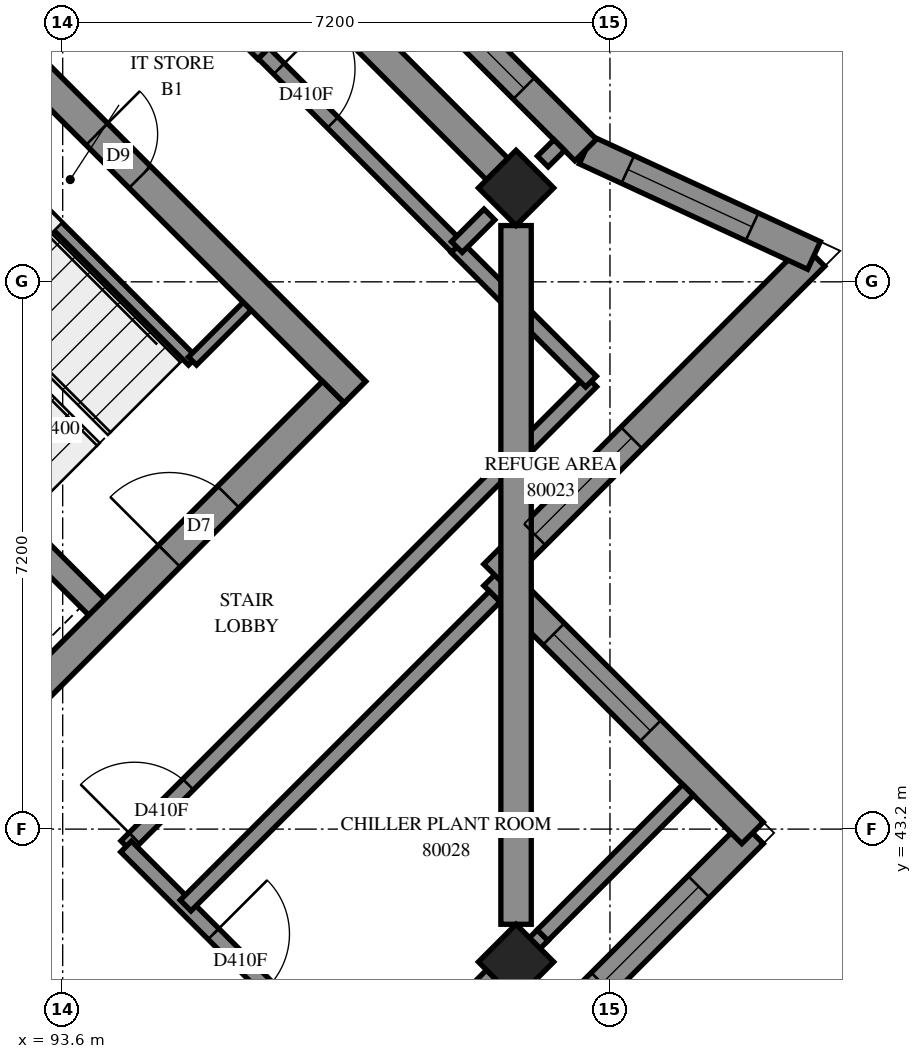
"""IFC4 building model, lengths in metres.
Left out: names, types, materials, properties, quantities, classifications, styles, units other than length and angle.
Written with IfcOpenShell. Run it as: python <this file> out.ifc"""

import sys

from ifc_helpers import new_model, si_unit, direction, frame, frame_2d, origin, origin_2d, place, context, subcontext, project, spatial, polyline, rectangle, outline, extrude, element, fill, save


model = new_model("IFC4")
c1 = context("Model", 3, precision=1e-05, world=origin(), true_north=direction((0.0, 1.0)))
c2 = subcontext(c1, "Body", "Model", "MODEL_VIEW")
j1 = project(units=[si_unit("LENGTHUNIT", "METRE"), si_unit("PLANEANGLEUNIT", "RADIAN")], contexts=[c1])
p1 = place(None, origin())
s1 = spatial("IfcSite", under=j1, at=p1, CompositionType="ELEMENT")
p2 = place(p1, origin())
s2 = spatial("IfcBuilding", under=s1, at=p2, CompositionType="ELEMENT")
p3 = place(p2, frame((0.0, 0.0, 294.4)))
s3 = spatial("IfcBuildingStorey", under=s2, at=p3, CompositionType="ELEMENT", Elevation=294.4)
for number, where, z_axis, x_axis in (
    (1, (99.565, 51.635, 0.0), (0.0, 0.0, 1.0), (0.707, -0.707, 0.0)),
    (2, (99.565, 41.453, 0.0), (0.0, 0.0, 1.0), (0.707, -0.707, 0.0)),
):
    element("IfcColumn", number, at=place(p3, frame(where, z_axis=z_axis, x_axis=x_axis)), inside=s3, PredefinedType="COLUMN", context=c2, shape_type="SweptSolid", body=[
        extrude(rectangle(XDim=0.7, YDim=0.7, at=origin_2d()), origin(), (0.0, 0.0, 1.0), 3.5),
    ])
p4 = place(p3, frame((86.695, 59.696, -0.3), z_axis=(0.0, 0.0, 1.0), x_axis=(0.7071100706, -0.7071034917, 0.0)))
e3 = element("IfcWall", 3, at=p4, inside=s3, PredefinedType="SHEAR", context=c2, shape_type="SweptSolid", body=[
    extrude(outline(polyline([(0.0, 0.0), (15.2, 0.0), (15.2, 3.1), (0.0, 3.1), (0.0, 0.0)])), frame((0.0, 0.2, 0.0), z_axis=(0.0, -1.0, 0.0), x_axis=(1.0, 0.0, 0.0)), (0.0, 0.0, 1.0), 0.4),
])
p5 = place(p4, frame((10.4, 0.0, 0.3)))
e4 = element("IfcOpeningElement", 4, at=p5, cuts=e3, PredefinedType="OPENING", context=c2, shape_type="SweptSolid", body=[
    extrude(rectangle(XDim=0.8, YDim=2.1, at=frame_2d((0.4, 1.05))), frame((0.0, 0.21, 0.0), z_axis=(0.0, -1.0, 0.0), x_axis=(1.0, 0.0, 0.0)), (0.0, 0.0, 1.0), 0.42),
])
p6 = place(p3, frame((86.978, 38.766, -0.3), z_axis=(0.0, 0.0, 1.0), x_axis=(0.7071067812, 0.7071067812, 0.0)))
e5 = element("IfcWall", 5, at=p6, inside=s3, PredefinedType="SHEAR", context=c2, shape_type="SweptSolid", body=[
    extrude(outline(polyline([(0.0, 0.0), (14.4, 0.0), (14.4, 3.1), (0.0, 3.1), (0.0, 0.0)])), frame((0.0, 0.2, 0.0), z_axis=(0.0, -1.0, 0.0), x_axis=(1.0, 0.0, 0.0)), (0.0, 0.0, 1.0), 0.4),
])
p7 = place(p6, frame((4.55, 0.0, 0.3)))
e6 = element("IfcOpeningElement", 6, at=p7, cuts=e5, PredefinedType="OPENING", context=c2, shape_type="SweptSolid", body=[
    extrude(rectangle(XDim=1.1, YDim=2.1, at=frame_2d((0.55, 1.05))), frame((0.0, 0.21, 0.0), z_axis=(0.0, -1.0, 0.0), x_axis=(1.0, 0.0, 0.0)), (0.0, 0.0, 1.0), 0.42),
])
p8 = place(p6, frame((11.35, 0.0, 0.3)))
e7 = element("IfcOpeningElement", 7, at=p8, cuts=e5, PredefinedType="OPENING", context=c2, shape_type="SweptSolid", body=[
    extrude(rectangle(XDim=1.1, YDim=2.1, at=frame_2d((0.55, 1.05))), frame((0.0, 0.21, 0.0), z_axis=(0.0, -1.0, 0.0), x_axis=(1.0, 0.0, 0.0)), (0.0, 0.0, 1.0), 0.42),
])
p9 = place(p3, frame((88.958, 51.211, 0.0), z_axis=(0.0, 0.0, 1.0), x_axis=(0.7070998367, -0.7071137256, 0.0)))
e8 = element("IfcWall", 8, at=p9, inside=s3, PredefinedType="SOLIDWALL", context=c2, shape_type="SweptSolid", body=[
    extrude(outline(polyline([(0.0, 0.0), (7.2, 0.0), (7.2, 3.5), (0.0, 3.5), (0.0, 0.0)])), frame((0.0, 0.15, 0.0), z_axis=(0.0, -1.0, 0.0), x_axis=(1.0, 0.0, 0.0)), (0.0, 0.0, 1.0), 0.3),
])
p10 = place(p3, frame((89.382, 29.856, 0.0), z_axis=(0.0, 0.0, 1.0), x_axis=(0.7071094407, 0.7071041216, 0.0)))
e9 = element("IfcWall", 9, at=p10, inside=s3, PredefinedType="SOLIDWALL", context=c2, shape_type="SweptSolid", body=[
    extrude(outline(polyline([(-0.2, -0.2), (19.0, -0.2), (18.6, 0.2), (0.2, 0.2), (-0.2, -0.2)])), origin(), (0.0, 0.0, 1.0), 3.5),
])
p11 = place(p10, frame((1.9, 0.0, 0.7)))
e10 = element("IfcOpeningElement", 10, at=p11, cuts=e9, PredefinedType="OPENING", context=c2, shape_type="SweptSolid", body=[
    extrude(rectangle(XDim=1.8, YDim=2.2, at=frame_2d((0.9, 1.1))), frame((0.0, 0.21, 0.0), z_axis=(0.0, -1.0, 0.0), x_axis=(1.0, 0.0, 0.0)), (0.0, 0.0, 1.0), 0.42),
])
p12 = place(p10, frame((5.5, 0.0, 0.7)))
e11 = element("IfcOpeningElement", 11, at=p12, cuts=e9, PredefinedType="OPENING", context=c2, shape_type="SweptSolid", body=[
    extrude(rectangle(XDim=1.8, YDim=2.2, at=frame_2d((0.9, 1.1))), frame((0.0, 0.21, 0.0), z_axis=(0.0, -1.0, 0.0), x_axis=(1.0, 0.0, 0.0)), (0.0, 0.0, 1.0), 0.42),
])
p13 = place(p10, frame((8.8, 0.0, 0.7)))
e12 = element("IfcOpeningElement", 12, at=p13, cuts=e9, PredefinedType="OPENING", context=c2, shape_type="SweptSolid", body=[
    extrude(rectangle(XDim=1.8, YDim=2.2, at=frame_2d((0.9, 1.1))), frame((0.0, 0.21, 0.0), z_axis=(0.0, -1.0, 0.0), x_axis=(1.0, 0.0, 0.0)), (0.0, 0.0, 1.0), 0.42),
])
p14 = place(p10, frame((12.95, 0.0, 0.7)))
e13 = element("IfcOpeningElement", 13, at=p14, cuts=e9, PredefinedType="OPENING", context=c2, shape_type="SweptSolid", body=[
    extrude(rectangle(XDim=1.8, YDim=2.2, at=frame_2d((0.9, 1.1))), frame((0.0, 0.21, 0.0), z_axis=(0.0, -1.0, 0.0), x_axis=(1.0, 0.0, 0.0)), (0.0, 0.0, 1.0), 0.42),
])
p15 = place(p10, frame((16.0, 0.0, 0.7)))
e14 = element("IfcOpeningElement", 14, at=p15, cuts=e9, PredefinedType="OPENING", context=c2, shape_type="SweptSolid", body=[
    extrude(rectangle(XDim=1.8, YDim=2.2, at=frame_2d((0.9, 1.1))), frame((0.0, 0.21, 0.0), z_axis=(0.0, -1.0, 0.0), x_axis=(1.0, 0.0, 0.0)), (0.0, 0.0, 1.0), 0.42),
])
p16 = place(p3, frame((102.676, 43.15, 0.0), z_axis=(0.0, 0.0, 1.0), x_axis=(-0.7070963646, 0.7071171977, 0.0)))
e15 = element("IfcWall", 15, at=p16, inside=s3, PredefinedType="SOLIDWALL", context=c2, shape_type="SweptSolid", body=[
    extrude(outline(polyline([(-0.2, -0.2), (4.6, -0.2), (5.0, 0.2), (0.2, 0.2), (-0.2, -0.2)])), origin(), (0.0, 0.0, 1.0), 3.5),
])
p17 = place(p16, frame((1.9, 0.0, 0.7)))
e16 = element("IfcOpeningElement", 16, at=p17, cuts=e15, PredefinedType="OPENING", context=c2, shape_type="SweptSolid", body=[
    extrude(rectangle(XDim=1.8, YDim=2.2, at=frame_2d((0.9, 1.1))), frame((0.0, 0.21, 0.0), z_axis=(0.0, -1.0, 0.0), x_axis=(1.0, 0.0, 0.0)), (0.0, 0.0, 1.0), 0.42),
])
p18 = place(p3, frame((99.282, 46.544, 0.0), z_axis=(0.0, 0.0, 1.0), x_axis=(0.7071067812, 0.7071067812, 0.0)))
e17 = element("IfcWall", 17, at=p18, inside=s3, PredefinedType="SOLIDWALL", context=c2, shape_type="SweptSolid", body=[
    extrude(outline(polyline([(0.2, -0.2), (6.23, -0.2), (5.657, 0.2), (-0.2, 0.2), (0.2, -0.2)])), origin(), (0.0, 0.0, 1.0), 3.5),
])
p19 = place(p18, frame((0.75, 0.0, 0.7)))
e18 = element("IfcOpeningElement", 18, at=p19, cuts=e17, PredefinedType="OPENING", context=c2, shape_type="SweptSolid", body=[
    extrude(rectangle(XDim=1.8, YDim=2.2, at=frame_2d((0.9, 1.1))), frame((0.0, 0.21, 0.0), z_axis=(0.0, -1.0, 0.0), x_axis=(1.0, 0.0, 0.0)), (0.0, 0.0, 1.0), 0.42),
])
p20 = place(p3, frame((103.484, 50.747, 0.0), z_axis=(0.0, 0.0, 1.0), x_axis=(-0.9078558767, 0.4192823716, 0.0)))
e19 = element("IfcWall", 19, at=p20, inside=s3, PredefinedType="SOLIDWALL", context=c2, shape_type="SweptSolid", body=[
    extrude(outline(polyline([(-0.287, -0.2), (3.273, -0.2), (3.345, 0.2), (0.287, 0.2), (-0.287, -0.2)])), origin(), (0.0, 0.0, 1.0), 3.5),
])
p21 = place(p20, frame((0.898, 0.0, 0.7)))
e20 = element("IfcOpeningElement", 20, at=p21, cuts=e19, PredefinedType="OPENING", context=c2, shape_type="SweptSolid", body=[
    extrude(rectangle(XDim=1.8, YDim=2.2, at=frame_2d((0.9, 1.1))), frame((0.0, 0.21, 0.0), z_axis=(0.0, -1.0, 0.0), x_axis=(1.0, 0.0, 0.0)), (0.0, 0.0, 1.0), 0.42),
])
p22 = place(p3, frame((100.48, 52.134, 0.0), z_axis=(0.0, 0.0, 1.0), x_axis=(-0.7071067812, 0.7071067812, 0.0)))
e21 = element("IfcWall", 21, at=p22, inside=s3, PredefinedType="SOLIDWALL", context=c2, shape_type="SweptSolid", body=[
    extrude(outline(polyline([(0.036, -0.2), (6.718, -0.2), (6.718, 0.2), (-0.036, 0.2), (0.036, -0.2)])), origin(), (0.0, 0.0, 1.0), 3.5),
])
p23 = place(p22, frame((1.147, 0.0, 0.7)))
e22 = element("IfcOpeningElement", 22, at=p23, cuts=e21, PredefinedType="OPENING", context=c2, shape_type="SweptSolid", body=[
    extrude(rectangle(XDim=1.8, YDim=2.2, at=frame_2d((0.9, 1.1))), frame((0.0, 0.21, 0.0), z_axis=(0.0, -1.0, 0.0), x_axis=(1.0, 0.0, 0.0)), (0.0, 0.0, 1.0), 0.42),
])
p24 = place(p22, frame((4.306, 0.0, 0.7)))
e23 = element("IfcOpeningElement", 23, at=p24, cuts=e21, PredefinedType="OPENING", context=c2, shape_type="SweptSolid", body=[
    extrude(rectangle(XDim=1.8, YDim=2.2, at=frame_2d((0.9, 1.1))), frame((0.0, 0.21, 0.0), z_axis=(0.0, -1.0, 0.0), x_axis=(1.0, 0.0, 0.0)), (0.0, 0.0, 1.0), 0.42),
])
p25 = place(p3, frame((91.313, 53.354, 0.0), z_axis=(0.0, 0.0, 1.0), x_axis=(0.7071067812, -0.7071067812, 0.0)))
e24 = element("IfcWall", 24, at=p25, inside=s3, PredefinedType="PARTITIONING", context=c2, shape_type="SweptSolid", body=[
    extrude(outline(polyline([(0.0, 0.0), (5.65, 0.0), (5.65, 3.5), (0.0, 3.5), (0.0, 0.0)])), frame((0.0, 0.075, 0.0), z_axis=(0.0, -1.0, 0.0), x_axis=(1.0, 0.0, 0.0)), (0.0, 0.0, 1.0), 0.15),
])
p26 = place(p3, frame((95.308, 49.358, 0.0), z_axis=(0.0, 0.0, 1.0), x_axis=(0.70705776, 0.707155799, 0.0)))
e25 = element("IfcWall", 25, at=p26, inside=s3, PredefinedType="PARTITIONING", context=c2, shape_type="SweptSolid", body=[
    extrude(outline(polyline([(0.0, 0.0), (1.02, 0.0), (1.02, 3.5), (0.0, 3.5), (0.0, 0.0)])), frame((0.0, 0.075, 0.0), z_axis=(0.0, -1.0, 0.0), x_axis=(1.0, 0.0, 0.0)), (0.0, 0.0, 1.0), 0.15),
])
p27 = place(p3, frame((86.833, 62.805, 0.0), z_axis=(0.0, 0.0, 1.0), x_axis=(0.7072045138, -0.7070090351, 0.0)))
e26 = element("IfcWall", 26, at=p27, inside=s3, PredefinedType="PARTITIONING", context=c2, shape_type="SweptSolid", body=[
    extrude(rectangle(XDim=13.301, YDim=0.2, at=frame_2d((6.65, 0.0))), origin(), (0.0, 0.0, 1.0), 3.5),
])
p28 = place(p27, frame((6.387, 0.0, 0.0)))
e27 = element("IfcOpeningElement", 27, at=p28, cuts=e26, PredefinedType="OPENING", context=c2, shape_type="SweptSolid", body=[
    extrude(rectangle(XDim=1.0, YDim=2.1, at=frame_2d((0.5, 1.05))), frame((0.0, 0.11, 0.0), z_axis=(0.0, -1.0, 0.0), x_axis=(1.0, 0.0, 0.0)), (0.0, 0.0, 1.0), 0.22),
])
p29 = place(p3, frame((94.438, 42.974, 0.0), z_axis=(0.0, 0.0, 1.0), x_axis=(0.7071067812, 0.7071067812, 0.0)))
e28 = element("IfcWall", 28, at=p29, inside=s3, PredefinedType="PARTITIONING", context=c2, shape_type="SweptSolid", body=[
    extrude(rectangle(XDim=8.649, YDim=0.2, at=frame_2d((4.325, 0.0))), origin(), (0.0, 0.0, 1.0), 3.5),
])
p30 = place(p29, frame((0.15, 0.0, 0.0)))
e29 = element("IfcOpeningElement", 29, at=p30, cuts=e28, PredefinedType="OPENING", context=c2, shape_type="SweptSolid", body=[
    extrude(rectangle(XDim=1.0, YDim=2.1, at=frame_2d((0.5, 1.05))), frame((0.0, 0.11, 0.0), z_axis=(0.0, -1.0, 0.0), x_axis=(1.0, 0.0, 0.0)), (0.0, 0.0, 1.0), 0.22),
])
p31 = place(p3, frame((94.434, 42.971, 0.0), z_axis=(0.0, 0.0, 1.0), x_axis=(0.7071067812, -0.7071067812, 0.0)))
e30 = element("IfcWall", 30, at=p31, inside=s3, PredefinedType="PARTITIONING", context=c2, shape_type="SweptSolid", body=[
    extrude(rectangle(XDim=4.701, YDim=0.2, at=frame_2d((2.35, 0.0))), origin(), (0.0, 0.0, 1.0), 3.5),
])
p32 = place(p31, frame((1.626, 0.0, 0.0)))
e31 = element("IfcOpeningElement", 31, at=p32, cuts=e30, PredefinedType="OPENING", context=c2, shape_type="SweptSolid", body=[
    extrude(rectangle(XDim=1.0, YDim=2.1, at=frame_2d((0.5, 1.05))), frame((0.0, 0.11, 0.0), z_axis=(0.0, -1.0, 0.0), x_axis=(1.0, 0.0, 0.0)), (0.0, 0.0, 1.0), 0.22),
])
p33 = place(p3, frame((96.244, 53.406, 0.0), z_axis=(0.0, 0.0, 1.0), x_axis=(0.7068288851, -0.7073845681, 0.0)))
e32 = element("IfcWall", 32, at=p33, inside=s3, PredefinedType="PARTITIONING", context=c2, shape_type="SweptSolid", body=[
    extrude(rectangle(XDim=3.599, YDim=0.2, at=frame_2d((1.8, 0.0))), origin(), (0.0, 0.0, 1.0), 3.5),
])
p34 = place(p33, frame((0.286, 0.0, 0.0)))
e33 = element("IfcOpeningElement", 33, at=p34, cuts=e32, PredefinedType="OPENING", context=c2, shape_type="SweptSolid", body=[
    extrude(rectangle(XDim=1.0, YDim=2.1, at=frame_2d((0.5, 1.05))), frame((0.0, 0.11, 0.0), z_axis=(0.0, -1.0, 0.0), x_axis=(1.0, 0.0, 0.0)), (0.0, 0.0, 1.0), 0.22),
])
p35 = place(p3, frame((98.783, 50.855, 0.0), z_axis=(0.0, 0.0, 1.0), x_axis=(0.7071067812, -0.7071067812, 0.0)))
e34 = element("IfcWall", 34, at=p35, inside=s3, PredefinedType="PARTITIONING", context=c2, shape_type="SweptSolid", body=[
    extrude(rectangle(XDim=2.5, YDim=0.2, at=frame_2d((1.25, 0.0))), origin(), (0.0, 0.0, 1.0), 3.5),
])
p36 = place(p3, frame((97.763, 39.649, 0.0), z_axis=(0.0, 0.0, 1.0), x_axis=(0.7066468317, 0.7075664316, 0.0)))
e35 = element("IfcWall", 35, at=p36, inside=s3, PredefinedType="PARTITIONING", context=c2, shape_type="SweptSolid", body=[
    extrude(rectangle(XDim=3.045, YDim=0.2, at=frame_2d((1.522, 0.0))), origin(), (0.0, 0.0, 1.0), 3.0),
])
p37 = place(p3, frame((92.951, 41.485, 0.0), z_axis=(0.0, 0.0, 1.0), x_axis=(0.7071067812, -0.7071067812, 0.0)))
e36 = element("IfcWall", 36, at=p37, inside=s3, PredefinedType="PARTITIONING", context=c2, shape_type="SweptSolid", body=[
    extrude(rectangle(XDim=1.1, YDim=0.2, at=frame_2d((0.55, 0.0))), origin(), (0.0, 0.0, 1.0), 3.5),
])
p38 = place(p3, frame((98.786, 50.858, 0.0), z_axis=(0.0, 0.0, 1.0), x_axis=(0.7071067812, 0.7071067812, 0.0)))
e37 = element("IfcWall", 37, at=p38, inside=s3, PredefinedType="PARTITIONING", context=c2, shape_type="SweptSolid", body=[
    extrude(rectangle(XDim=0.605, YDim=0.2, at=frame_2d((0.303, 0.0))), origin(), (0.0, 0.0, 1.0), 3.5),
])
p39 = place(p3, frame((95.217, 42.195, 0.0), z_axis=(0.0, 0.0, 1.0), x_axis=(0.7072806841, 0.7069328355, 0.0)))
e38 = element("IfcWall", 38, at=p39, inside=s3, PredefinedType="PARTITIONING", context=c2, shape_type="SweptSolid", body=[
    extrude(outline(polyline([(0.0, -0.1), (5.75, -0.1), (5.75, 0.1), (0.0, 0.1), (0.0, -0.1)])), origin(), (0.0, 0.0, 1.0), 3.5),
])
p40 = place(p3, frame((99.914, 41.804, 0.0), z_axis=(0.0, 0.0, 1.0), x_axis=(0.7071067812, 0.7071067812, 0.0)))
e39 = element("IfcWall", 39, at=p40, inside=s3, PredefinedType="PARTITIONING", context=c2, shape_type="SweptSolid", body=[
    extrude(outline(polyline([(0.0, -0.1), (2.705, -0.1), (2.705, 0.1), (0.0, 0.1), (0.0, -0.1)])), origin(), (0.0, 0.0, 1.0), 3.5),
])
p41 = place(p3, frame((99.917, 51.983, 0.0), z_axis=(0.0, 0.0, 1.0), x_axis=(0.7087439748, 0.7054657881, 0.0)))
e40 = element("IfcWall", 40, at=p41, inside=s3, PredefinedType="PARTITIONING", context=c2, shape_type="SweptSolid", body=[
    extrude(outline(polyline([(0.0, -0.1), (0.305, -0.1), (0.305, 0.1), (0.0, 0.1), (0.0, -0.1)])), origin(), (0.0, 0.0, 1.0), 3.5),
])
p42 = place(p15, origin())
e41 = element("IfcWindow", 41, at=p42, inside=s3, PartitioningType="SINGLE_PANEL", PredefinedType="WINDOW", context=c2, shape_type="SweptSolid", body=[
    extrude(rectangle(XDim=1.8, YDim=2.2, at=frame_2d((0.9, 1.1))), frame((0.0, 0.08, 0.0), z_axis=(0.0, -1.0, 0.0), x_axis=(1.0, 0.0, 0.0)), (0.0, 0.0, 1.0), 0.06),
])
fill(e14, e41)
p43 = place(p17, origin())
e42 = element("IfcWindow", 42, at=p43, inside=s3, PartitioningType="SINGLE_PANEL", PredefinedType="WINDOW", context=c2, shape_type="SweptSolid", body=[
    extrude(rectangle(XDim=1.8, YDim=2.2, at=frame_2d((0.9, 1.1))), frame((0.0, 0.08, 0.0), z_axis=(0.0, -1.0, 0.0), x_axis=(1.0, 0.0, 0.0)), (0.0, 0.0, 1.0), 0.06),
])
fill(e16, e42)
p44 = place(p19, origin())
e43 = element("IfcWindow", 43, at=p44, inside=s3, PartitioningType="SINGLE_PANEL", PredefinedType="WINDOW", context=c2, shape_type="SweptSolid", body=[
    extrude(rectangle(XDim=1.8, YDim=2.2, at=frame_2d((0.9, 1.1))), frame((0.0, 0.08, 0.0), z_axis=(0.0, -1.0, 0.0), x_axis=(1.0, 0.0, 0.0)), (0.0, 0.0, 1.0), 0.06),
])
fill(e18, e43)
p45 = place(p21, origin())
e44 = element("IfcWindow", 44, at=p45, inside=s3, PartitioningType="SINGLE_PANEL", PredefinedType="WINDOW", context=c2, shape_type="SweptSolid", body=[
    extrude(rectangle(XDim=1.8, YDim=2.2, at=frame_2d((0.9, 1.1))), frame((0.0, 0.08, 0.0), z_axis=(0.0, -1.0, 0.0), x_axis=(1.0, 0.0, 0.0)), (0.0, 0.0, 1.0), 0.06),
])
fill(e20, e44)
p46 = place(p23, origin())
e45 = element("IfcWindow", 45, at=p46, inside=s3, PartitioningType="SINGLE_PANEL", PredefinedType="WINDOW", context=c2, shape_type="SweptSolid", body=[
    extrude(rectangle(XDim=1.8, YDim=2.2, at=frame_2d((0.9, 1.1))), frame((0.0, 0.08, 0.0), z_axis=(0.0, -1.0, 0.0), x_axis=(1.0, 0.0, 0.0)), (0.0, 0.0, 1.0), 0.06),
])
fill(e22, e45)
p47 = place(p5, origin())
e46 = element("IfcDoor", 46, at=p47, inside=s3, OperationType="SINGLE_SWING_RIGHT", PredefinedType="DOOR", context=c2, shape_type="SweptSolid", body=[
    extrude(rectangle(XDim=0.8, YDim=2.1, at=frame_2d((0.4, 1.05))), frame((0.0, 0.025, 0.0), z_axis=(0.0, -1.0, 0.0), x_axis=(1.0, 0.0, 0.0)), (0.0, 0.0, 1.0), 0.05),
])
fill(e4, e46)
p48 = place(p8, origin())
e47 = element("IfcDoor", 47, at=p48, inside=s3, OperationType="SINGLE_SWING_RIGHT", PredefinedType="DOOR", context=c2, shape_type="SweptSolid", body=[
    extrude(rectangle(XDim=1.1, YDim=2.1, at=frame_2d((0.55, 1.05))), frame((0.0, 0.025, 0.0), z_axis=(0.0, -1.0, 0.0), x_axis=(1.0, 0.0, 0.0)), (0.0, 0.0, 1.0), 0.05),
])
fill(e7, e47)
p49 = place(p30, origin())
e48 = element("IfcDoor", 48, at=p49, inside=s3, OperationType="SINGLE_SWING_LEFT", PredefinedType="DOOR", context=c2, shape_type="SweptSolid", body=[
    extrude(rectangle(XDim=1.0, YDim=2.1, at=frame_2d((0.5, 1.05))), frame((0.0, 0.025, 0.0), z_axis=(0.0, -1.0, 0.0), x_axis=(1.0, 0.0, 0.0)), (0.0, 0.0, 1.0), 0.05),
])
fill(e29, e48)
p50 = place(p34, origin())
e49 = element("IfcDoor", 49, at=p50, inside=s3, OperationType="SINGLE_SWING_LEFT", PredefinedType="DOOR", context=c2, shape_type="SweptSolid", body=[
    extrude(rectangle(XDim=1.0, YDim=2.1, at=frame_2d((0.5, 1.05))), frame((0.0, 0.025, 0.0), z_axis=(0.0, -1.0, 0.0), x_axis=(1.0, 0.0, 0.0)), (0.0, 0.0, 1.0), 0.05),
])
fill(e33, e49)
p51 = place(p32, origin())
e50 = element("IfcDoor", 50, at=p51, inside=s3, OperationType="SINGLE_SWING_RIGHT", PredefinedType="DOOR", context=c2, shape_type="SweptSolid", body=[
    extrude(rectangle(XDim=1.0, YDim=2.1, at=frame_2d((0.5, 1.05))), frame((0.0, 0.025, 0.0), z_axis=(0.0, -1.0, 0.0), x_axis=(1.0, 0.0, 0.0)), (0.0, 0.0, 1.0), 0.05),
])
fill(e31, e50)
save(model, sys.argv[1])
